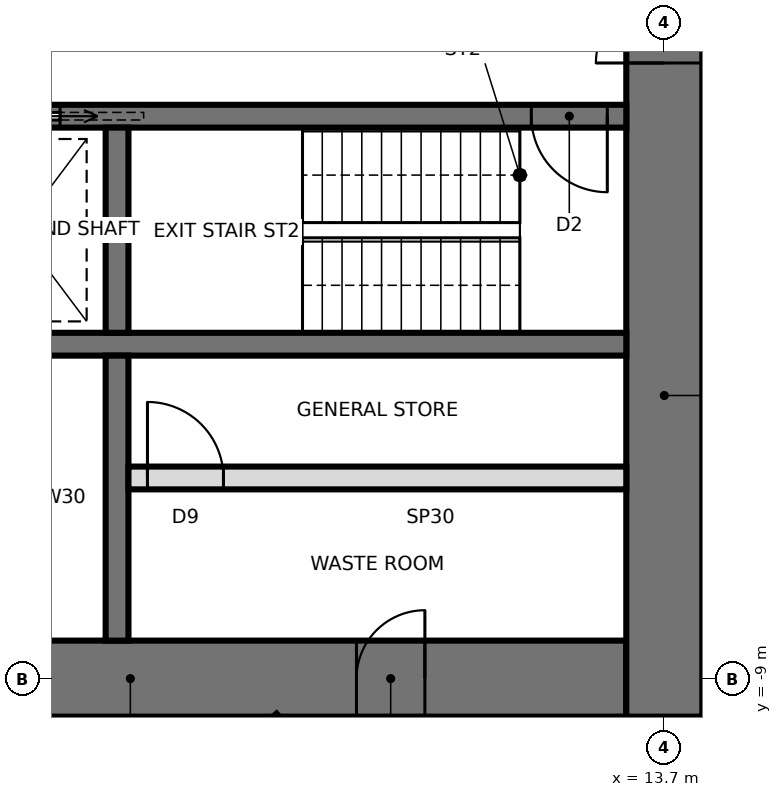
"""IFC4 building model, lengths in metres.
Left out: names, types, materials, properties, quantities, classifications, styles, units other than length and angle.
Written with IfcOpenShell. Run it as: python <this file> out.ifc"""

import sys

from ifc_helpers import new_model, si_unit, direction, frame, frame_2d, origin, place, context, subcontext, project, spatial, rectangle, extrude, element, fill, save


model = new_model("IFC4")
c1 = context("Model", 3, precision=1e-05, world=origin(), true_north=direction((0.0, 1.0)))
c2 = subcontext(c1, "Body", "Model", "MODEL_VIEW")
j1 = project(units=[si_unit("LENGTHUNIT", "METRE"), si_unit("PLANEANGLEUNIT", "RADIAN")], contexts=[c1])
p1 = place(None, origin())
s1 = spatial("IfcSite", under=j1, at=p1, CompositionType="ELEMENT")
p2 = place(p1, origin())
s2 = spatial("IfcBuilding", under=s1, at=p2, CompositionType="ELEMENT")
p3 = place(p2, frame((0.0, 0.0, 268.6)))
s3 = spatial("IfcBuildingStorey", under=s2, at=p3, CompositionType="ELEMENT", Elevation=268.6)
p4 = place(p3, frame((-13.2, -9.0, 0.0), z_axis=(0.0, 0.0, 1.0), x_axis=(1.0, 0.0, 0.0)))
e1 = element("IfcWall", 1, at=p4, inside=s3, PredefinedType="SHEAR", context=c2, shape_type="SweptSolid", body=[
    extrude(rectangle(XDim=26.4, YDim=1.0, at=frame_2d((13.2, 0.0))), origin(), (0.0, 0.0, 1.0), 4.2),
])
p5 = place(p4, frame((2.65, 0.0, 0.0)))
e2 = element("IfcOpeningElement", 2, at=p5, cuts=e1, PredefinedType="OPENING", context=c2, shape_type="SweptSolid", body=[
    extrude(rectangle(XDim=0.9, YDim=2.1, at=frame_2d((0.45, 1.05))), frame((0.0, 0.51, 0.0), z_axis=(0.0, -1.0, 0.0), x_axis=(1.0, 0.0, 0.0)), (0.0, 0.0, 1.0), 1.02),
])
p6 = place(p4, frame((9.5, 0.0, 0.0)))
e3 = element("IfcOpeningElement", 3, at=p6, cuts=e1, PredefinedType="OPENING", context=c2, shape_type="SweptSolid", body=[
    extrude(rectangle(XDim=0.9, YDim=2.1, at=frame_2d((0.45, 1.05))), frame((0.0, 0.51, 0.0), z_axis=(0.0, -1.0, 0.0), x_axis=(1.0, 0.0, 0.0)), (0.0, 0.0, 1.0), 1.02),
])
p7 = place(p4, frame((16.0, 0.0, 0.0)))
e4 = element("IfcOpeningElement", 4, at=p7, cuts=e1, PredefinedType="OPENING", context=c2, shape_type="SweptSolid", body=[
    extrude(rectangle(XDim=0.9, YDim=2.1, at=frame_2d((0.45, 1.05))), frame((0.0, 0.51, 0.0), z_axis=(0.0, -1.0, 0.0), x_axis=(1.0, 0.0, 0.0)), (0.0, 0.0, 1.0), 1.02),
])
p8 = place(p4, frame((22.85, 0.0, 0.0)))
e5 = element("IfcOpeningElement", 5, at=p8, cuts=e1, PredefinedType="OPENING", context=c2, shape_type="SweptSolid", body=[
    extrude(rectangle(XDim=0.9, YDim=2.1, at=frame_2d((0.45, 1.05))), frame((0.0, 0.51, 0.0), z_axis=(0.0, -1.0, 0.0), x_axis=(1.0, 0.0, 0.0)), (0.0, 0.0, 1.0), 1.02),
])
p9 = place(p3, frame((13.7, -9.5, 0.0), z_axis=(0.0, 0.0, 1.0), x_axis=(0.0, 1.0, 0.0)))
e6 = element("IfcWall", 6, at=p9, inside=s3, PredefinedType="SHEAR", context=c2, shape_type="SweptSolid", body=[
    extrude(rectangle(XDim=19.0, YDim=1.0, at=frame_2d((9.5, 0.0))), origin(), (0.0, 0.0, 1.0), 4.2),
])
p10 = place(p9, frame((8.6, 0.0, 0.0)))
e7 = element("IfcOpeningElement", 7, at=p10, cuts=e6, PredefinedType="OPENING", context=c2, shape_type="SweptSolid", body=[
    extrude(rectangle(XDim=1.8, YDim=2.4, at=frame_2d((0.9, 1.2))), frame((0.0, 0.51, 0.0), z_axis=(0.0, -1.0, 0.0), x_axis=(1.0, 0.0, 0.0)), (0.0, 0.0, 1.0), 1.02),
])
p11 = place(p3, frame((-13.2, -1.6, 0.0), z_axis=(0.0, 0.0, 1.0), x_axis=(1.0, 0.0, 0.0)))
e8 = element("IfcWall", 8, at=p11, inside=s3, PredefinedType="SHEAR", context=c2, shape_type="SweptSolid", body=[
    extrude(rectangle(XDim=26.4, YDim=0.3, at=frame_2d((13.2, 0.0))), origin(), (0.0, 0.0, 1.0), 4.2),
])
p12 = place(p11, frame((25.15, 0.0, 0.0)))
e9 = element("IfcOpeningElement", 9, at=p12, cuts=e8, PredefinedType="OPENING", context=c2, shape_type="SweptSolid", body=[
    extrude(rectangle(XDim=1.0, YDim=2.1, at=frame_2d((0.5, 1.05))), frame((0.0, 0.16, 0.0), z_axis=(0.0, -1.0, 0.0), x_axis=(1.0, 0.0, 0.0)), (0.0, 0.0, 1.0), 0.32),
])
p13 = place(p11, frame((6.95, 0.0, 0.0)))
e10 = element("IfcOpeningElement", 10, at=p13, cuts=e8, PredefinedType="OPENING", context=c2, shape_type="SweptSolid", body=[
    extrude(rectangle(XDim=0.9, YDim=2.1, at=frame_2d((0.45, 1.05))), frame((0.0, 0.16, 0.0), z_axis=(0.0, -1.0, 0.0), x_axis=(1.0, 0.0, 0.0)), (0.0, 0.0, 1.0), 0.32),
])
p14 = place(p11, frame((9.55, 0.0, 0.0)))
e11 = element("IfcOpeningElement", 11, at=p14, cuts=e8, PredefinedType="OPENING", context=c2, shape_type="SweptSolid", body=[
    extrude(rectangle(XDim=0.9, YDim=2.1, at=frame_2d((0.45, 1.05))), frame((0.0, 0.16, 0.0), z_axis=(0.0, -1.0, 0.0), x_axis=(1.0, 0.0, 0.0)), (0.0, 0.0, 1.0), 0.32),
])
p15 = place(p11, frame((12.75, 0.0, 0.0)))
e12 = element("IfcOpeningElement", 12, at=p15, cuts=e8, PredefinedType="OPENING", context=c2, shape_type="SweptSolid", body=[
    extrude(rectangle(XDim=0.9, YDim=2.1, at=frame_2d((0.45, 1.05))), frame((0.0, 0.16, 0.0), z_axis=(0.0, -1.0, 0.0), x_axis=(1.0, 0.0, 0.0)), (0.0, 0.0, 1.0), 0.32),
])
p16 = place(p11, frame((15.25, 0.0, 0.0)))
e13 = element("IfcOpeningElement", 13, at=p16, cuts=e8, PredefinedType="OPENING", context=c2, shape_type="SweptSolid", body=[
    extrude(rectangle(XDim=1.1, YDim=2.3, at=frame_2d((0.55, 1.15))), frame((0.0, 0.16, 0.0), z_axis=(0.0, -1.0, 0.0), x_axis=(1.0, 0.0, 0.0)), (0.0, 0.0, 1.0), 0.32),
])
p17 = place(p11, frame((17.85, 0.0, 0.0)))
e14 = element("IfcOpeningElement", 14, at=p17, cuts=e8, PredefinedType="OPENING", context=c2, shape_type="SweptSolid", body=[
    extrude(rectangle(XDim=1.1, YDim=2.3, at=frame_2d((0.55, 1.15))), frame((0.0, 0.16, 0.0), z_axis=(0.0, -1.0, 0.0), x_axis=(1.0, 0.0, 0.0)), (0.0, 0.0, 1.0), 0.32),
])
p18 = place(p11, frame((5.55, 0.0, 0.0)))
e15 = element("IfcOpeningElement", 15, at=p18, cuts=e8, PredefinedType="OPENING", context=c2, shape_type="SweptSolid", body=[
    extrude(rectangle(XDim=0.9, YDim=2.1, at=frame_2d((0.45, 1.05))), frame((0.0, 0.16, 0.0), z_axis=(0.0, -1.0, 0.0), x_axis=(1.0, 0.0, 0.0)), (0.0, 0.0, 1.0), 0.32),
])
p19 = place(p3, frame((-13.2, -4.6, 0.0), z_axis=(0.0, 0.0, 1.0), x_axis=(1.0, 0.0, 0.0)))
e16 = element("IfcWall", 16, at=p19, inside=s3, PredefinedType="SHEAR", context=c2, shape_type="SweptSolid", body=[
    extrude(rectangle(XDim=26.4, YDim=0.3, at=frame_2d((13.2, 0.0))), origin(), (0.0, 0.0, 1.0), 4.2),
])
p20 = place(p3, frame((6.5, -1.75, 0.0), z_axis=(0.0, 0.0, 1.0), x_axis=(0.0, -1.0, 0.0)))
e17 = element("IfcWall", 17, at=p20, inside=s3, PredefinedType="SHEAR", context=c2, shape_type="SweptSolid", body=[
    extrude(rectangle(XDim=2.7, YDim=0.3, at=frame_2d((1.35, 0.0))), origin(), (0.0, 0.0, 1.0), 4.2),
])
p21 = place(p3, frame((6.5, -4.75, 0.0), z_axis=(0.0, 0.0, 1.0), x_axis=(0.0, -1.0, 0.0)))
e18 = element("IfcWall", 18, at=p21, inside=s3, PredefinedType="SHEAR", context=c2, shape_type="SweptSolid", body=[
    extrude(rectangle(XDim=3.75, YDim=0.3, at=frame_2d((1.875, 0.0))), origin(), (0.0, 0.0, 1.0), 4.2),
])
p22 = place(p3, frame((6.65, -6.36, 0.0), z_axis=(0.0, 0.0, 1.0), x_axis=(1.0, 0.0, 0.0)))
e19 = element("IfcWall", 19, at=p22, inside=s3, PredefinedType="PARTITIONING", context=c2, shape_type="SweptSolid", body=[
    extrude(rectangle(XDim=6.55, YDim=0.3, at=frame_2d((3.275, 0.0))), origin(), (0.0, 0.0, 1.0), 4.04),
])
p23 = place(p22, frame((0.25, 0.0, 0.0)))
e20 = element("IfcOpeningElement", 20, at=p23, cuts=e19, PredefinedType="OPENING", context=c2, shape_type="SweptSolid", body=[
    extrude(rectangle(XDim=1.0, YDim=2.4, at=frame_2d((0.5, 1.2))), frame((0.0, 0.16, 0.0), z_axis=(0.0, -1.0, 0.0), x_axis=(1.0, 0.0, 0.0)), (0.0, 0.0, 1.0), 0.32),
])
p24 = place(p3, frame((13.66, -15.171, 0.0), z_axis=(0.0, 0.0, 1.0), x_axis=(-0.669137936348, 0.74313822546, 0.0)))
e21 = element("IfcWall", 21, at=p24, inside=s3, PredefinedType="PARTITIONING", context=c2, shape_type="SweptSolid", body=[
    extrude(rectangle(XDim=7.631, YDim=0.12, at=frame_2d((3.815, 0.0))), origin(), (0.0, 0.0, 1.0), 4.04),
])
p25 = place(p24, frame((3.315, 0.0, 0.0)))
e22 = element("IfcOpeningElement", 22, at=p25, cuts=e21, PredefinedType="OPENING", context=c2, shape_type="SweptSolid", body=[
    extrude(rectangle(XDim=1.0, YDim=2.4, at=frame_2d((0.5, 1.2))), frame((0.0, 0.07, 0.0), z_axis=(0.0, -1.0, 0.0), x_axis=(1.0, 0.0, 0.0)), (0.0, 0.0, 1.0), 0.14),
])
p26 = place(p10, origin())
e23 = element("IfcDoor", 23, at=p26, inside=s3, OperationType="DOUBLE_DOOR_SINGLE_SWING", PredefinedType="DOOR", context=c2, shape_type="SweptSolid", body=[
    extrude(rectangle(XDim=1.72, YDim=2.36, at=frame_2d((0.9, 1.18))), frame((0.0, 0.025, 0.0), z_axis=(0.0, -1.0, 0.0), x_axis=(1.0, 0.0, 0.0)), (0.0, 0.0, 1.0), 0.05),
    extrude(rectangle(XDim=0.04, YDim=2.4, at=frame_2d((0.02, 1.2))), frame((0.0, 0.25, 0.0), z_axis=(0.0, -1.0, 0.0), x_axis=(1.0, 0.0, 0.0)), (0.0, 0.0, 1.0), 0.5),
    extrude(rectangle(XDim=0.04, YDim=2.4, at=frame_2d((1.78, 1.2))), frame((0.0, 0.25, 0.0), z_axis=(0.0, -1.0, 0.0), x_axis=(1.0, 0.0, 0.0)), (0.0, 0.0, 1.0), 0.5),
    extrude(rectangle(XDim=1.72, YDim=0.04, at=frame_2d((0.9, 2.38))), frame((0.0, 0.25, 0.0), z_axis=(0.0, -1.0, 0.0), x_axis=(1.0, 0.0, 0.0)), (0.0, 0.0, 1.0), 0.5),
])
fill(e7, e23)
p27 = place(p12, frame((1.0, 0.0, 0.0), z_axis=(0.0, 0.0, 1.0), x_axis=(-1.0, 0.0, 0.0)))
e24 = element("IfcDoor", 24, at=p27, inside=s3, OperationType="SINGLE_SWING_LEFT", PredefinedType="DOOR", context=c2, shape_type="SweptSolid", body=[
    extrude(rectangle(XDim=1.0, YDim=2.1, at=frame_2d((0.5, 1.05))), frame((0.0, 0.025, 0.0), z_axis=(0.0, -1.0, 0.0), x_axis=(1.0, 0.0, 0.0)), (0.0, 0.0, 1.0), 0.05),
])
fill(e9, e24)
p28 = place(p17, frame((1.1, 0.0, 0.0), z_axis=(0.0, 0.0, 1.0), x_axis=(-1.0, 0.0, 0.0)))
e25 = element("IfcDoor", 25, at=p28, inside=s3, OperationType="SLIDING_TO_LEFT", PredefinedType="DOOR", context=c2, shape_type="SweptSolid", body=[
    extrude(rectangle(XDim=1.1, YDim=2.3, at=frame_2d((0.55, 1.15))), frame((0.0, 0.025, 0.0), z_axis=(0.0, -1.0, 0.0), x_axis=(1.0, 0.0, 0.0)), (0.0, 0.0, 1.0), 0.05),
])
fill(e14, e25)
p29 = place(p8, origin())
e26 = element("IfcDoor", 26, at=p29, inside=s3, OperationType="SINGLE_SWING_RIGHT", PredefinedType="DOOR", context=c2, shape_type="SweptSolid", body=[
    extrude(rectangle(XDim=0.82, YDim=2.06, at=frame_2d((0.45, 1.03))), frame((0.0, 0.025, 0.0), z_axis=(0.0, -1.0, 0.0), x_axis=(1.0, 0.0, 0.0)), (0.0, 0.0, 1.0), 0.05),
    extrude(rectangle(XDim=0.04, YDim=2.1, at=frame_2d((0.02, 1.05))), frame((0.0, 0.25, 0.0), z_axis=(0.0, -1.0, 0.0), x_axis=(1.0, 0.0, 0.0)), (0.0, 0.0, 1.0), 0.5),
    extrude(rectangle(XDim=0.04, YDim=2.1, at=frame_2d((0.88, 1.05))), frame((0.0, 0.25, 0.0), z_axis=(0.0, -1.0, 0.0), x_axis=(1.0, 0.0, 0.0)), (0.0, 0.0, 1.0), 0.5),
    extrude(rectangle(XDim=0.82, YDim=0.04, at=frame_2d((0.45, 2.08))), frame((0.0, 0.25, 0.0), z_axis=(0.0, -1.0, 0.0), x_axis=(1.0, 0.0, 0.0)), (0.0, 0.0, 1.0), 0.5),
])
fill(e5, e26)
p30 = place(p23, origin())
e27 = element("IfcDoor", 27, at=p30, inside=s3, OperationType="SINGLE_SWING_LEFT", PredefinedType="DOOR", context=c2, shape_type="SweptSolid", body=[
    extrude(rectangle(XDim=1.0, YDim=2.4, at=frame_2d((0.5, 1.2))), frame((0.0, 0.025, 0.0), z_axis=(0.0, -1.0, 0.0), x_axis=(1.0, 0.0, 0.0)), (0.0, 0.0, 1.0), 0.05),
])
fill(e20, e27)
save(model, sys.argv[1])
